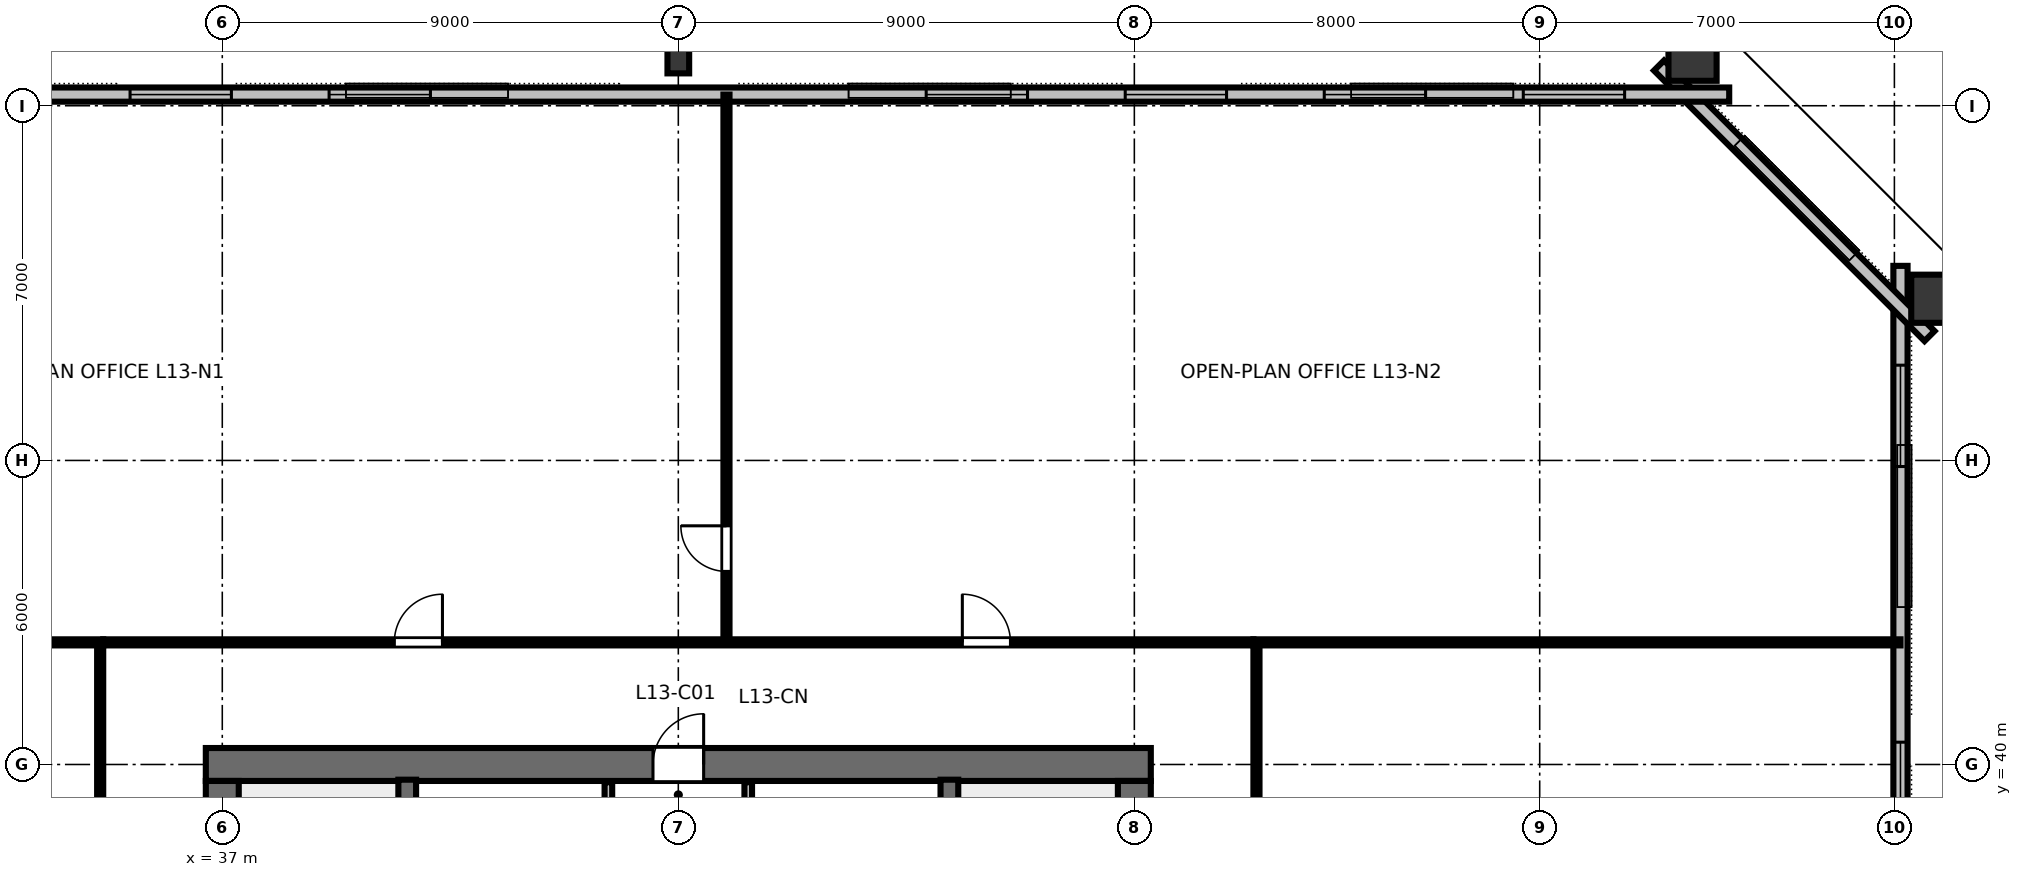
"""IFC4 building model, lengths in metres.
Left out: names, types, materials, properties, quantities, classifications, styles, units other than length and angle.
Written with IfcOpenShell. Run it as: python <this file> out.ifc"""

import sys

from ifc_helpers import new_model, si_unit, direction, frame, frame_2d, origin, origin_2d, place, context, subcontext, project, spatial, rectangle, hollow_rectangle, i_section, extrude, element, fill, save


model = new_model("IFC4")
c1 = context("Model", 3, precision=1e-05, world=origin(), true_north=direction((0.0, 1.0)))
c2 = subcontext(c1, "Body", "Model", "MODEL_VIEW")
j1 = project(units=[si_unit("LENGTHUNIT", "METRE"), si_unit("PLANEANGLEUNIT", "RADIAN")], contexts=[c1])
p1 = place(None, origin())
s1 = spatial("IfcSite", under=j1, at=p1, CompositionType="ELEMENT")
p2 = place(p1, origin())
s2 = spatial("IfcBuilding", under=s1, at=p2, CompositionType="ELEMENT")
p3 = place(p2, frame((0.0, 0.0, 53.2)))
s3 = spatial("IfcBuildingStorey", under=s2, at=p3, CompositionType="ELEMENT", Elevation=53.2)
p4 = place(p3, frame((36.675, 40.0, 0.0), z_axis=(0.0, 0.0, 1.0), x_axis=(1.0, 0.0, 0.0)))
e1 = element("IfcWall", 1, at=p4, inside=s3, PredefinedType="SHEAR", context=c2, shape_type="SweptSolid", body=[
    extrude(rectangle(XDim=18.65, YDim=0.65, at=frame_2d((9.325, 0.0))), origin(), (0.0, 0.0, 1.0), 3.36),
])
p5 = place(p4, frame((8.825, 0.0, 0.0)))
e2 = element("IfcOpeningElement", 2, at=p5, cuts=e1, PredefinedType="OPENING", context=c2, shape_type="SweptSolid", body=[
    extrude(rectangle(XDim=1.0, YDim=2.15, at=frame_2d((0.5, 1.075))), frame((0.0, 0.335, 0.0), z_axis=(0.0, -1.0, 0.0), x_axis=(1.0, 0.0, 0.0)), (0.0, 0.0, 1.0), 0.67),
])
p6 = place(p3, frame((37.0, 24.325, 0.0), z_axis=(0.0, 0.0, 1.0), x_axis=(0.0, 1.0, 0.0)))
e3 = element("IfcWall", 3, at=p6, inside=s3, PredefinedType="SHEAR", context=c2, shape_type="SweptSolid", body=[
    extrude(rectangle(XDim=15.35, YDim=0.65, at=frame_2d((7.675, 0.0))), origin(), (0.0, 0.0, 1.0), 3.36),
])
p7 = place(p6, frame((5.2, 0.0, 0.0)))
e4 = element("IfcOpeningElement", 4, at=p7, cuts=e3, PredefinedType="OPENING", context=c2, shape_type="SweptSolid", body=[
    extrude(rectangle(XDim=1.15, YDim=2.15, at=frame_2d((0.575, 1.075))), frame((0.0, 0.335, 0.0), z_axis=(0.0, -1.0, 0.0), x_axis=(1.0, 0.0, 0.0)), (0.0, 0.0, 1.0), 0.67),
])
p8 = place(p3, frame((55.0, 24.325, 0.0), z_axis=(0.0, 0.0, 1.0), x_axis=(0.0, 1.0, 0.0)))
e5 = element("IfcWall", 5, at=p8, inside=s3, PredefinedType="SHEAR", context=c2, shape_type="SweptSolid", body=[
    extrude(rectangle(XDim=15.35, YDim=0.65, at=frame_2d((7.675, 0.0))), origin(), (0.0, 0.0, 1.0), 3.36),
])
p9 = place(p8, frame((5.2, 0.0, 0.0)))
e6 = element("IfcOpeningElement", 6, at=p9, cuts=e5, PredefinedType="OPENING", context=c2, shape_type="SweptSolid", body=[
    extrude(rectangle(XDim=1.15, YDim=2.15, at=frame_2d((0.575, 1.075))), frame((0.0, 0.335, 0.0), z_axis=(0.0, -1.0, 0.0), x_axis=(1.0, 0.0, 0.0)), (0.0, 0.0, 1.0), 0.67),
])
for number, where, z_axis, x_axis in (
    (7, (70.907, 49.191, 0.0), (0.0, 0.0, 1.0), (0.0, 1.0, 0.0)),
    (8, (66.016, 54.067, 0.0), (0.0, 0.0, 1.0), (1.0, 0.0, 0.0)),
):
    element("IfcColumn", number, at=place(p3, frame(where, z_axis=z_axis, x_axis=x_axis)), inside=s3, PredefinedType="COLUMN", context=c2, shape_type="SweptSolid", body=[
        extrude(hollow_rectangle(XDim=0.95, YDim=1.15, WallThickness=0.06, at=origin_2d()), origin(), (0.0, 0.0, 1.0), 3.358),
    ])
p10 = place(p3, frame((46.0, 53.88, 0.0), z_axis=(0.0, 0.0, 1.0), x_axis=(1.0, 0.0, 0.0)))
e9 = element("IfcColumn", 9, at=p10, inside=s3, PredefinedType="COLUMN", context=c2, shape_type="SweptSolid", body=[
    extrude(i_section(OverallWidth=0.428, OverallDepth=0.483, WebThickness=0.051, FlangeThickness=0.082, FilletRadius=0.025, at=origin_2d()), origin(), (0.0, 0.0, 1.0), 3.358),
])
p11 = place(p3, frame((70.12, 14.16, 0.0), z_axis=(0.0, 0.0, 1.0), x_axis=(0.0, 1.0, 0.0)))
e10 = element("IfcWall", 10, at=p11, inside=s3, PredefinedType="STANDARD", context=c2, shape_type="SweptSolid", body=[
    extrude(rectangle(XDim=35.68, YDim=0.28, at=frame_2d((17.84, 0.0))), origin(), (0.0, 0.0, 1.0), 3.36),
])
p12 = place(p11, frame((1.96, 0.0, 0.8)))
e11 = element("IfcOpeningElement", 11, at=p12, cuts=e10, PredefinedType="OPENING", context=c2, shape_type="SweptSolid", body=[
    extrude(rectangle(XDim=2.0, YDim=1.95, at=frame_2d((1.0, 0.975))), frame((0.0, 0.15, 0.0), z_axis=(0.0, -1.0, 0.0), x_axis=(1.0, 0.0, 0.0)), (0.0, 0.0, 1.0), 0.3),
])
p13 = place(p11, frame((9.4, 0.0, 0.8)))
e12 = element("IfcOpeningElement", 12, at=p13, cuts=e10, PredefinedType="OPENING", context=c2, shape_type="SweptSolid", body=[
    extrude(rectangle(XDim=2.0, YDim=1.95, at=frame_2d((1.0, 0.975))), frame((0.0, 0.15, 0.0), z_axis=(0.0, -1.0, 0.0), x_axis=(1.0, 0.0, 0.0)), (0.0, 0.0, 1.0), 0.3),
])
p14 = place(p11, frame((13.12, 0.0, 0.8)))
e13 = element("IfcOpeningElement", 13, at=p14, cuts=e10, PredefinedType="OPENING", context=c2, shape_type="SweptSolid", body=[
    extrude(rectangle(XDim=2.0, YDim=1.95, at=frame_2d((1.0, 0.975))), frame((0.0, 0.15, 0.0), z_axis=(0.0, -1.0, 0.0), x_axis=(1.0, 0.0, 0.0)), (0.0, 0.0, 1.0), 0.3),
])
p15 = place(p11, frame((20.56, 0.0, 0.8)))
e14 = element("IfcOpeningElement", 14, at=p15, cuts=e10, PredefinedType="OPENING", context=c2, shape_type="SweptSolid", body=[
    extrude(rectangle(XDim=2.0, YDim=1.95, at=frame_2d((1.0, 0.975))), frame((0.0, 0.15, 0.0), z_axis=(0.0, -1.0, 0.0), x_axis=(1.0, 0.0, 0.0)), (0.0, 0.0, 1.0), 0.3),
])
p16 = place(p11, frame((24.28, 0.0, 0.8)))
e15 = element("IfcOpeningElement", 15, at=p16, cuts=e10, PredefinedType="OPENING", context=c2, shape_type="SweptSolid", body=[
    extrude(rectangle(XDim=2.0, YDim=1.95, at=frame_2d((1.0, 0.975))), frame((0.0, 0.15, 0.0), z_axis=(0.0, -1.0, 0.0), x_axis=(1.0, 0.0, 0.0)), (0.0, 0.0, 1.0), 0.3),
])
p17 = place(p11, frame((31.72, 0.0, 0.8)))
e16 = element("IfcOpeningElement", 16, at=p17, cuts=e10, PredefinedType="OPENING", context=c2, shape_type="SweptSolid", body=[
    extrude(rectangle(XDim=2.0, YDim=1.95, at=frame_2d((1.0, 0.975))), frame((0.0, 0.15, 0.0), z_axis=(0.0, -1.0, 0.0), x_axis=(1.0, 0.0, 0.0)), (0.0, 0.0, 1.0), 0.3),
])
p18 = place(p3, frame((70.694, 48.455, 0.0), z_axis=(0.0, 0.0, 1.0), x_axis=(-0.707106781187, 0.707106781187, 0.0)))
e17 = element("IfcWall", 17, at=p18, inside=s3, PredefinedType="STANDARD", context=c2, shape_type="SweptSolid", body=[
    extrude(rectangle(XDim=7.551, YDim=0.28, at=frame_2d((3.775, 0.0))), origin(), (0.0, 0.0, 1.0), 3.36),
])
p19 = place(p3, frame((66.74, 53.22, 0.0), z_axis=(0.0, 0.0, 1.0), x_axis=(-1.0, 0.0, 0.0)))
e18 = element("IfcWall", 18, at=p19, inside=s3, PredefinedType="STANDARD", context=c2, shape_type="SweptSolid", body=[
    extrude(rectangle(XDim=41.48, YDim=0.28, at=frame_2d((20.74, 0.0))), origin(), (0.0, 0.0, 1.0), 3.36),
])
p20 = place(p19, frame((2.064, 0.0, 0.8)))
e19 = element("IfcOpeningElement", 19, at=p20, cuts=e18, PredefinedType="OPENING", context=c2, shape_type="SweptSolid", body=[
    extrude(rectangle(XDim=2.0, YDim=1.95, at=frame_2d((1.0, 0.975))), frame((0.0, 0.15, 0.0), z_axis=(0.0, -1.0, 0.0), x_axis=(1.0, 0.0, 0.0)), (0.0, 0.0, 1.0), 0.3),
])
p21 = place(p19, frame((5.992, 0.0, 0.8)))
e20 = element("IfcOpeningElement", 20, at=p21, cuts=e18, PredefinedType="OPENING", context=c2, shape_type="SweptSolid", body=[
    extrude(rectangle(XDim=2.0, YDim=1.95, at=frame_2d((1.0, 0.975))), frame((0.0, 0.15, 0.0), z_axis=(0.0, -1.0, 0.0), x_axis=(1.0, 0.0, 0.0)), (0.0, 0.0, 1.0), 0.3),
])
p22 = place(p19, frame((9.92, 0.0, 0.8)))
e21 = element("IfcOpeningElement", 21, at=p22, cuts=e18, PredefinedType="OPENING", context=c2, shape_type="SweptSolid", body=[
    extrude(rectangle(XDim=2.0, YDim=1.95, at=frame_2d((1.0, 0.975))), frame((0.0, 0.15, 0.0), z_axis=(0.0, -1.0, 0.0), x_axis=(1.0, 0.0, 0.0)), (0.0, 0.0, 1.0), 0.3),
])
p23 = place(p19, frame((13.848, 0.0, 0.8)))
e22 = element("IfcOpeningElement", 22, at=p23, cuts=e18, PredefinedType="OPENING", context=c2, shape_type="SweptSolid", body=[
    extrude(rectangle(XDim=2.0, YDim=1.95, at=frame_2d((1.0, 0.975))), frame((0.0, 0.15, 0.0), z_axis=(0.0, -1.0, 0.0), x_axis=(1.0, 0.0, 0.0)), (0.0, 0.0, 1.0), 0.3),
])
p24 = place(p19, frame((25.632, 0.0, 0.8)))
e23 = element("IfcOpeningElement", 23, at=p24, cuts=e18, PredefinedType="OPENING", context=c2, shape_type="SweptSolid", body=[
    extrude(rectangle(XDim=2.0, YDim=1.95, at=frame_2d((1.0, 0.975))), frame((0.0, 0.15, 0.0), z_axis=(0.0, -1.0, 0.0), x_axis=(1.0, 0.0, 0.0)), (0.0, 0.0, 1.0), 0.3),
])
p25 = place(p19, frame((29.56, 0.0, 0.8)))
e24 = element("IfcOpeningElement", 24, at=p25, cuts=e18, PredefinedType="OPENING", context=c2, shape_type="SweptSolid", body=[
    extrude(rectangle(XDim=2.0, YDim=1.95, at=frame_2d((1.0, 0.975))), frame((0.0, 0.15, 0.0), z_axis=(0.0, -1.0, 0.0), x_axis=(1.0, 0.0, 0.0)), (0.0, 0.0, 1.0), 0.3),
])
p26 = place(p19, frame((33.488, 0.0, 0.8)))
e25 = element("IfcOpeningElement", 25, at=p26, cuts=e18, PredefinedType="OPENING", context=c2, shape_type="SweptSolid", body=[
    extrude(rectangle(XDim=2.0, YDim=1.95, at=frame_2d((1.0, 0.975))), frame((0.0, 0.15, 0.0), z_axis=(0.0, -1.0, 0.0), x_axis=(1.0, 0.0, 0.0)), (0.0, 0.0, 1.0), 0.3),
])
p27 = place(p19, frame((37.416, 0.0, 0.8)))
e26 = element("IfcOpeningElement", 26, at=p27, cuts=e18, PredefinedType="OPENING", context=c2, shape_type="SweptSolid", body=[
    extrude(rectangle(XDim=2.0, YDim=1.95, at=frame_2d((1.0, 0.975))), frame((0.0, 0.15, 0.0), z_axis=(0.0, -1.0, 0.0), x_axis=(1.0, 0.0, 0.0)), (0.0, 0.0, 1.0), 0.3),
])
for number, where, z_axis, x_axis in (
    (27, (40.65, 32.0, 0.0), (0.0, 0.0, 1.0), (0.0, 1.0, 0.0)),
    (28, (51.35, 32.0, 0.0), (0.0, 0.0, 1.0), (0.0, 1.0, 0.0)),
):
    element("IfcWall", number, at=place(p3, frame(where, z_axis=z_axis, x_axis=x_axis)), inside=s3, PredefinedType="SHEAR", context=c2, shape_type="SweptSolid", body=[
        extrude(rectangle(XDim=7.7, YDim=0.35, at=frame_2d((3.85, 0.0))), origin(), (0.0, 0.0, 1.0), 3.6),
    ])
p28 = place(p3, frame((44.62, 35.72, 0.0), z_axis=(0.0, 0.0, 1.0), x_axis=(0.0, 1.0, 0.0)))
e29 = element("IfcWall", 29, at=p28, inside=s3, PredefinedType="PARTITIONING", context=c2, shape_type="SweptSolid", body=[
    extrude(rectangle(XDim=3.93, YDim=0.15, at=frame_2d((1.965, 0.0))), origin(), (0.0, 0.0, 1.0), 3.36),
])
p29 = place(p28, frame((1.5, 0.0, 0.0)))
e30 = element("IfcOpeningElement", 30, at=p29, cuts=e29, PredefinedType="OPENING", context=c2, shape_type="SweptSolid", body=[
    extrude(rectangle(XDim=0.9, YDim=2.15, at=frame_2d((0.45, 1.075))), frame((0.0, 0.085, 0.0), z_axis=(0.0, -1.0, 0.0), x_axis=(1.0, 0.0, 0.0)), (0.0, 0.0, 1.0), 0.17),
])
p30 = place(p3, frame((47.38, 35.72, 0.0), z_axis=(0.0, 0.0, 1.0), x_axis=(0.0, 1.0, 0.0)))
e31 = element("IfcWall", 31, at=p30, inside=s3, PredefinedType="PARTITIONING", context=c2, shape_type="SweptSolid", body=[
    extrude(rectangle(XDim=3.93, YDim=0.15, at=frame_2d((1.965, 0.0))), origin(), (0.0, 0.0, 1.0), 3.36),
])
p31 = place(p30, frame((1.5, 0.0, 0.0)))
e32 = element("IfcOpeningElement", 32, at=p31, cuts=e31, PredefinedType="OPENING", context=c2, shape_type="SweptSolid", body=[
    extrude(rectangle(XDim=0.9, YDim=2.15, at=frame_2d((0.45, 1.075))), frame((0.0, 0.085, 0.0), z_axis=(0.0, -1.0, 0.0), x_axis=(1.0, 0.0, 0.0)), (0.0, 0.0, 1.0), 0.17),
])
p32 = place(p3, frame((46.95, 42.41, 0.0), z_axis=(0.0, 0.0, 1.0), x_axis=(0.0, 1.0, 0.0)))
e33 = element("IfcWall", 33, at=p32, inside=s3, PredefinedType="PARTITIONING", context=c2, shape_type="SweptSolid", body=[
    extrude(rectangle(XDim=10.81, YDim=0.12, at=frame_2d((5.405, 0.0))), origin(), (0.0, 0.0, 1.0), 2.64),
])
p33 = place(p32, frame((1.4, 0.0, 0.0)))
e34 = element("IfcOpeningElement", 34, at=p33, cuts=e33, PredefinedType="OPENING", context=c2, shape_type="SweptSolid", body=[
    extrude(rectangle(XDim=0.9, YDim=2.15, at=frame_2d((0.45, 1.075))), frame((0.0, 0.07, 0.0), z_axis=(0.0, -1.0, 0.0), x_axis=(1.0, 0.0, 0.0)), (0.0, 0.0, 1.0), 0.14),
])
p34 = place(p3, frame((34.65, 42.41, 0.0), z_axis=(0.0, 0.0, 1.0), x_axis=(1.0, 0.0, 0.0)))
e35 = element("IfcWall", 35, at=p34, inside=s3, PredefinedType="PARTITIONING", context=c2, shape_type="SweptSolid", body=[
    extrude(rectangle(XDim=22.7, YDim=0.12, at=frame_2d((11.35, 0.0))), origin(), (0.0, 0.0, 1.0), 2.64),
])
p35 = place(p34, frame((5.745, 0.0, 0.0)))
e36 = element("IfcOpeningElement", 36, at=p35, cuts=e35, PredefinedType="OPENING", context=c2, shape_type="SweptSolid", body=[
    extrude(rectangle(XDim=0.95, YDim=2.15, at=frame_2d((0.475, 1.075))), frame((0.0, 0.07, 0.0), z_axis=(0.0, -1.0, 0.0), x_axis=(1.0, 0.0, 0.0)), (0.0, 0.0, 1.0), 0.14),
])
p36 = place(p34, frame((16.955, 0.0, 0.0)))
e37 = element("IfcOpeningElement", 37, at=p36, cuts=e35, PredefinedType="OPENING", context=c2, shape_type="SweptSolid", body=[
    extrude(rectangle(XDim=0.95, YDim=2.15, at=frame_2d((0.475, 1.075))), frame((0.0, 0.07, 0.0), z_axis=(0.0, -1.0, 0.0), x_axis=(1.0, 0.0, 0.0)), (0.0, 0.0, 1.0), 0.14),
])
p37 = place(p3, frame((34.59, 21.65, 0.0), z_axis=(0.0, 0.0, 1.0), x_axis=(0.0, 1.0, 0.0)))
e38 = element("IfcWall", 38, at=p37, inside=s3, PredefinedType="PARTITIONING", context=c2, shape_type="SweptSolid", body=[
    extrude(rectangle(XDim=20.7, YDim=0.12, at=frame_2d((10.35, 0.0))), origin(), (0.0, 0.0, 1.0), 2.64),
])
p38 = place(p37, frame((9.875, 0.0, 0.0)))
e39 = element("IfcOpeningElement", 39, at=p38, cuts=e38, PredefinedType="OPENING", context=c2, shape_type="SweptSolid", body=[
    extrude(rectangle(XDim=0.95, YDim=2.15, at=frame_2d((0.475, 1.075))), frame((0.0, 0.07, 0.0), z_axis=(0.0, -1.0, 0.0), x_axis=(1.0, 0.0, 0.0)), (0.0, 0.0, 1.0), 0.14),
])
p39 = place(p3, frame((57.41, 21.65, 0.0), z_axis=(0.0, 0.0, 1.0), x_axis=(0.0, 1.0, 0.0)))
e40 = element("IfcWall", 40, at=p39, inside=s3, PredefinedType="PARTITIONING", context=c2, shape_type="SweptSolid", body=[
    extrude(rectangle(XDim=20.7, YDim=0.12, at=frame_2d((10.35, 0.0))), origin(), (0.0, 0.0, 1.0), 2.64),
])
p40 = place(p39, frame((5.479, 0.0, 0.0)))
e41 = element("IfcOpeningElement", 41, at=p40, cuts=e40, PredefinedType="OPENING", context=c2, shape_type="SweptSolid", body=[
    extrude(rectangle(XDim=0.95, YDim=2.15, at=frame_2d((0.475, 1.075))), frame((0.0, 0.07, 0.0), z_axis=(0.0, -1.0, 0.0), x_axis=(1.0, 0.0, 0.0)), (0.0, 0.0, 1.0), 0.14),
])
p41 = place(p39, frame((15.629, 0.0, 0.0)))
e42 = element("IfcOpeningElement", 42, at=p41, cuts=e40, PredefinedType="OPENING", context=c2, shape_type="SweptSolid", body=[
    extrude(rectangle(XDim=0.95, YDim=2.15, at=frame_2d((0.475, 1.075))), frame((0.0, 0.07, 0.0), z_axis=(0.0, -1.0, 0.0), x_axis=(1.0, 0.0, 0.0)), (0.0, 0.0, 1.0), 0.14),
])
for number, where, z_axis, x_axis in (
    (43, (34.65, 42.41, 0.0), (0.0, 0.0, 1.0), (-1.0, 0.0, 0.0)),
    (44, (57.35, 42.41, 0.0), (0.0, 0.0, 1.0), (1.0, 0.0, 0.0)),
):
    element("IfcWall", number, at=place(p3, frame(where, z_axis=z_axis, x_axis=x_axis)), inside=s3, PredefinedType="PARTITIONING", context=c2, shape_type="SweptSolid", body=[
        extrude(rectangle(XDim=12.77, YDim=0.12, at=frame_2d((6.385, 0.0))), origin(), (0.0, 0.0, 1.0), 2.64),
    ])
p42 = place(p16, origin())
e45 = element("IfcWindow", 45, at=p42, inside=s3, PartitioningType="SINGLE_PANEL", PredefinedType="WINDOW", context=c2, shape_type="SweptSolid", body=[
    extrude(rectangle(XDim=2.0, YDim=1.95, at=frame_2d((1.0, 0.975))), frame((0.0, 0.03, 0.0), z_axis=(0.0, -1.0, 0.0), x_axis=(1.0, 0.0, 0.0)), (0.0, 0.0, 1.0), 0.06),
])
fill(e15, e45)
p43 = place(p17, origin())
e46 = element("IfcWindow", 46, at=p43, inside=s3, PartitioningType="SINGLE_PANEL", PredefinedType="WINDOW", context=c2, shape_type="SweptSolid", body=[
    extrude(rectangle(XDim=2.0, YDim=1.95, at=frame_2d((1.0, 0.975))), frame((0.0, 0.03, 0.0), z_axis=(0.0, -1.0, 0.0), x_axis=(1.0, 0.0, 0.0)), (0.0, 0.0, 1.0), 0.06),
])
fill(e16, e46)
p44 = place(p20, origin())
e47 = element("IfcWindow", 47, at=p44, inside=s3, PartitioningType="SINGLE_PANEL", PredefinedType="WINDOW", context=c2, shape_type="SweptSolid", body=[
    extrude(rectangle(XDim=2.0, YDim=1.95, at=frame_2d((1.0, 0.975))), frame((0.0, 0.03, 0.0), z_axis=(0.0, -1.0, 0.0), x_axis=(1.0, 0.0, 0.0)), (0.0, 0.0, 1.0), 0.06),
])
fill(e19, e47)
p45 = place(p21, origin())
e48 = element("IfcWindow", 48, at=p45, inside=s3, PartitioningType="SINGLE_PANEL", PredefinedType="WINDOW", context=c2, shape_type="SweptSolid", body=[
    extrude(rectangle(XDim=2.0, YDim=1.95, at=frame_2d((1.0, 0.975))), frame((0.0, 0.03, 0.0), z_axis=(0.0, -1.0, 0.0), x_axis=(1.0, 0.0, 0.0)), (0.0, 0.0, 1.0), 0.06),
])
fill(e20, e48)
p46 = place(p22, origin())
e49 = element("IfcWindow", 49, at=p46, inside=s3, PartitioningType="SINGLE_PANEL", PredefinedType="WINDOW", context=c2, shape_type="SweptSolid", body=[
    extrude(rectangle(XDim=2.0, YDim=1.95, at=frame_2d((1.0, 0.975))), frame((0.0, 0.03, 0.0), z_axis=(0.0, -1.0, 0.0), x_axis=(1.0, 0.0, 0.0)), (0.0, 0.0, 1.0), 0.06),
])
fill(e21, e49)
p47 = place(p23, origin())
e50 = element("IfcWindow", 50, at=p47, inside=s3, PartitioningType="SINGLE_PANEL", PredefinedType="WINDOW", context=c2, shape_type="SweptSolid", body=[
    extrude(rectangle(XDim=2.0, YDim=1.95, at=frame_2d((1.0, 0.975))), frame((0.0, 0.03, 0.0), z_axis=(0.0, -1.0, 0.0), x_axis=(1.0, 0.0, 0.0)), (0.0, 0.0, 1.0), 0.06),
])
fill(e22, e50)
p48 = place(p24, origin())
e51 = element("IfcWindow", 51, at=p48, inside=s3, PartitioningType="SINGLE_PANEL", PredefinedType="WINDOW", context=c2, shape_type="SweptSolid", body=[
    extrude(rectangle(XDim=2.0, YDim=1.95, at=frame_2d((1.0, 0.975))), frame((0.0, 0.03, 0.0), z_axis=(0.0, -1.0, 0.0), x_axis=(1.0, 0.0, 0.0)), (0.0, 0.0, 1.0), 0.06),
])
fill(e23, e51)
p49 = place(p25, origin())
e52 = element("IfcWindow", 52, at=p49, inside=s3, PartitioningType="SINGLE_PANEL", PredefinedType="WINDOW", context=c2, shape_type="SweptSolid", body=[
    extrude(rectangle(XDim=2.0, YDim=1.95, at=frame_2d((1.0, 0.975))), frame((0.0, 0.03, 0.0), z_axis=(0.0, -1.0, 0.0), x_axis=(1.0, 0.0, 0.0)), (0.0, 0.0, 1.0), 0.06),
])
fill(e24, e52)
p50 = place(p5, origin())
e53 = element("IfcDoor", 53, at=p50, inside=s3, OperationType="SINGLE_SWING_RIGHT", PredefinedType="DOOR", context=c2, shape_type="SweptSolid", body=[
    extrude(rectangle(XDim=1.0, YDim=2.15, at=frame_2d((0.5, 1.075))), frame((0.0, 0.025, 0.0), z_axis=(0.0, -1.0, 0.0), x_axis=(1.0, 0.0, 0.0)), (0.0, 0.0, 1.0), 0.05),
])
fill(e2, e53)
p51 = place(p33, origin())
e54 = element("IfcDoor", 54, at=p51, inside=s3, OperationType="SINGLE_SWING_RIGHT", PredefinedType="DOOR", context=c2, shape_type="SweptSolid", body=[
    extrude(rectangle(XDim=0.9, YDim=2.15, at=frame_2d((0.45, 1.075))), frame((0.0, 0.025, 0.0), z_axis=(0.0, -1.0, 0.0), x_axis=(1.0, 0.0, 0.0)), (0.0, 0.0, 1.0), 0.05),
])
fill(e34, e54)
p52 = place(p35, origin())
e55 = element("IfcDoor", 55, at=p52, inside=s3, OperationType="SINGLE_SWING_RIGHT", PredefinedType="DOOR", context=c2, shape_type="SweptSolid", body=[
    extrude(rectangle(XDim=0.95, YDim=2.15, at=frame_2d((0.475, 1.075))), frame((0.0, 0.025, 0.0), z_axis=(0.0, -1.0, 0.0), x_axis=(1.0, 0.0, 0.0)), (0.0, 0.0, 1.0), 0.05),
])
fill(e36, e55)
p53 = place(p36, origin())
e56 = element("IfcDoor", 56, at=p53, inside=s3, OperationType="SINGLE_SWING_LEFT", PredefinedType="DOOR", context=c2, shape_type="SweptSolid", body=[
    extrude(rectangle(XDim=0.95, YDim=2.15, at=frame_2d((0.475, 1.075))), frame((0.0, 0.025, 0.0), z_axis=(0.0, -1.0, 0.0), x_axis=(1.0, 0.0, 0.0)), (0.0, 0.0, 1.0), 0.05),
])
fill(e37, e56)
save(model, sys.argv[1])
